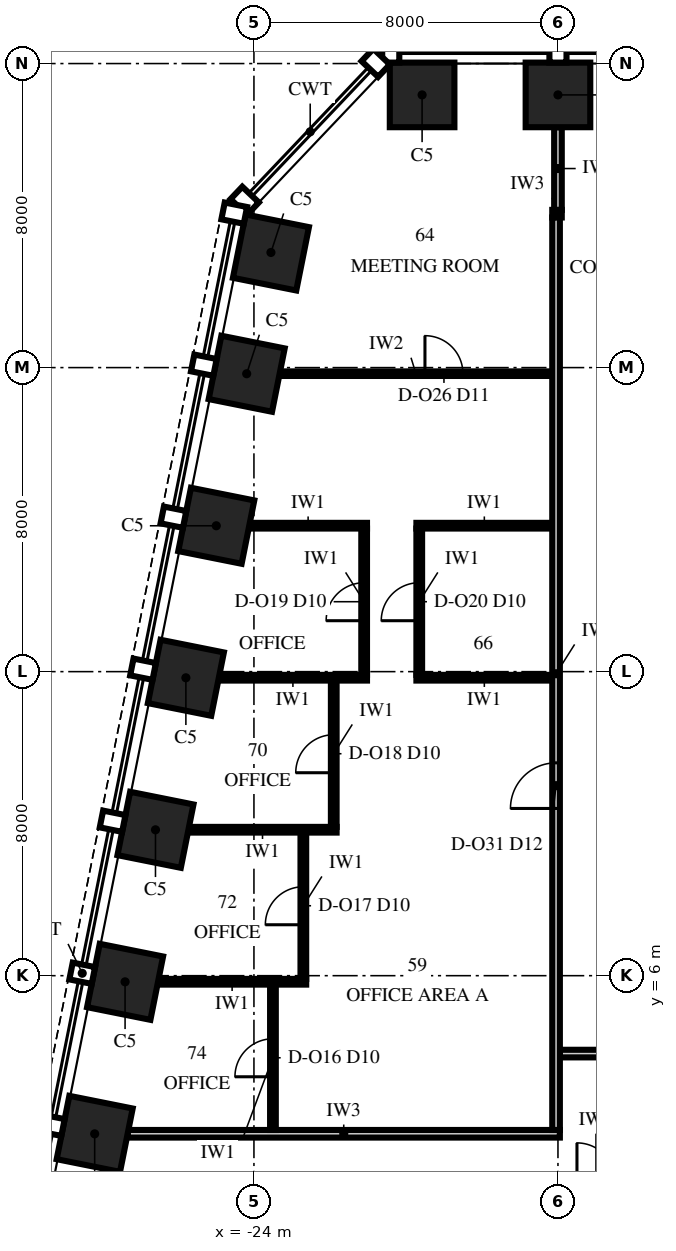
"""IFC4 building model, lengths in metres.
Left out: names, types, materials, properties, quantities, classifications, styles, units other than length and angle.
Written with IfcOpenShell. Run it as: python <this file> out.ifc"""

import sys

from ifc_helpers import new_model, si_unit, direction, frame, frame_2d, origin, origin_2d, place, context, subcontext, project, spatial, rectangle, extrude, element, fill, save


model = new_model("IFC4")
c1 = context("Model", 3, precision=1e-05, world=origin(), true_north=direction((0.0, 1.0)))
c2 = subcontext(c1, "Body", "Model", "MODEL_VIEW")
j1 = project(units=[si_unit("LENGTHUNIT", "METRE"), si_unit("PLANEANGLEUNIT", "RADIAN")], contexts=[c1])
p1 = place(None, origin())
s1 = spatial("IfcSite", under=j1, at=p1, CompositionType="ELEMENT")
p2 = place(p1, origin())
s2 = spatial("IfcBuilding", under=s1, at=p2, CompositionType="ELEMENT")
p3 = place(p2, frame((0.0, 0.0, 248.0)))
s3 = spatial("IfcBuildingStorey", under=s2, at=p3, CompositionType="ELEMENT", Elevation=248.0)
for number, where, z_axis, x_axis in (
    (1, (-16.0, 29.175, 0.0), (0.0, 0.0, 1.0), (-1.0, 0.0, 0.0)),
    (2, (-19.575, 29.175, 0.0), (0.0, 0.0, 1.0), (-1.0, 0.0, 0.0)),
    (3, (-23.553, 25.029, 0.0), (0.0, 0.0, 1.0), (-0.196, -0.981, 0.0)),
    (4, (-24.191, 21.838, 0.0), (0.0, 0.0, 1.0), (-0.196, -0.981, 0.0)),
    (5, (-24.991, 17.838, 0.0), (0.0, 0.0, 1.0), (-0.196, -0.981, 0.0)),
    (6, (-25.791, 13.838, 0.0), (0.0, 0.0, 1.0), (-0.196, -0.981, 0.0)),
    (7, (-26.591, 9.838, 0.0), (0.0, 0.0, 1.0), (-0.196, -0.981, 0.0)),
    (8, (-27.391, 5.838, 0.0), (0.0, 0.0, 1.0), (-0.196, -0.981, 0.0)),
    (9, (-28.191, 1.838, 0.0), (0.0, 0.0, 1.0), (-0.196, -0.981, 0.0)),
):
    element("IfcColumn", number, at=place(p3, frame(where, z_axis=z_axis, x_axis=x_axis)), inside=s3, PredefinedType="COLUMN", context=c2, shape_type="SweptSolid", body=[
        extrude(rectangle(XDim=1.7, YDim=1.7, at=origin_2d()), origin(), (0.0, 0.0, 1.0), 4.0),
    ])
p4 = place(p3, frame((-27.324, 1.84, 0.0), z_axis=(0.0, 0.0, 1.0), x_axis=(1.0, 0.0, 0.0)))
e10 = element("IfcWall", 10, at=p4, inside=s3, PredefinedType="PARTITIONING", context=c2, shape_type="SweptSolid", body=[
    extrude(rectangle(XDim=11.374, YDim=0.2, at=frame_2d((5.687, 0.0))), origin(), (0.0, 0.0, 1.0), 3.23),
])
p5 = place(p3, frame((-15.95, 3.95, 0.0), z_axis=(0.0, 0.0, 1.0), x_axis=(1.0, 0.0, 0.0)))
e11 = element("IfcWall", 11, at=p5, inside=s3, PredefinedType="PARTITIONING", context=c2, shape_type="SweptSolid", body=[
    extrude(rectangle(XDim=31.9, YDim=0.2, at=frame_2d((15.95, 0.0))), origin(), (0.0, 0.0, 1.0), 3.23),
])
p6 = place(p5, frame((3.35, 0.0, 0.0)))
e12 = element("IfcOpeningElement", 12, at=p6, cuts=e11, PredefinedType="OPENING", context=c2, shape_type="SweptSolid", body=[
    extrude(rectangle(XDim=1.2, YDim=2.4, at=frame_2d((0.6, 1.2))), frame((0.0, 0.115, 0.0), z_axis=(0.0, -1.0, 0.0), x_axis=(1.0, 0.0, 0.0)), (0.0, 0.0, 1.0), 0.23),
])
p7 = place(p5, frame((27.35, 0.0, 0.0)))
e13 = element("IfcOpeningElement", 13, at=p7, cuts=e11, PredefinedType="OPENING", context=c2, shape_type="SweptSolid", body=[
    extrude(rectangle(XDim=1.2, YDim=2.4, at=frame_2d((0.6, 1.2))), frame((0.0, 0.115, 0.0), z_axis=(0.0, -1.0, 0.0), x_axis=(1.0, 0.0, 0.0)), (0.0, 0.0, 1.0), 0.23),
])
p8 = place(p5, frame((15.35, 0.0, 0.0)))
e14 = element("IfcOpeningElement", 14, at=p8, cuts=e11, PredefinedType="OPENING", context=c2, shape_type="SweptSolid", body=[
    extrude(rectangle(XDim=1.2, YDim=2.4, at=frame_2d((0.6, 1.2))), frame((0.0, 0.115, 0.0), z_axis=(0.0, -1.0, 0.0), x_axis=(1.0, 0.0, 0.0)), (0.0, 0.0, 1.0), 0.23),
])
p9 = place(p3, frame((-26.524, 5.84, 0.0), z_axis=(0.0, 0.0, 1.0), x_axis=(1.0, 0.0, 0.0)))
e15 = element("IfcWall", 15, at=p9, inside=s3, PredefinedType="PARTITIONING", context=c2, shape_type="SweptSolid", body=[
    extrude(rectangle(XDim=3.899, YDim=0.15, at=frame_2d((1.949, 0.0))), origin(), (0.0, 0.0, 1.0), 2.842),
])
for number, where, z_axis, x_axis in (
    (16, (-25.724, 9.84, 0.0), (0.0, 0.0, 1.0), (1.0, 0.0, 0.0)),
    (17, (-24.924, 13.84, 0.0), (0.0, 0.0, 1.0), (1.0, 0.0, 0.0)),
):
    element("IfcWall", number, at=place(p3, frame(where, z_axis=z_axis, x_axis=x_axis)), inside=s3, PredefinedType="PARTITIONING", context=c2, shape_type="SweptSolid", body=[
        extrude(rectangle(XDim=3.899, YDim=0.15, at=frame_2d((1.949, 0.0))), origin(), (0.0, 0.0, 1.0), 3.23),
    ])
p10 = place(p3, frame((-19.725, 13.84, 0.0), z_axis=(0.0, 0.0, 1.0), x_axis=(1.0, 0.0, 0.0)))
e18 = element("IfcWall", 18, at=p10, inside=s3, PredefinedType="PARTITIONING", context=c2, shape_type="SweptSolid", body=[
    extrude(rectangle(XDim=3.575, YDim=0.15, at=frame_2d((1.788, 0.0))), origin(), (0.0, 0.0, 1.0), 3.85),
])
p11 = place(p3, frame((-24.124, 17.84, 0.0), z_axis=(0.0, 0.0, 1.0), x_axis=(1.0, 0.0, 0.0)))
e19 = element("IfcWall", 19, at=p11, inside=s3, PredefinedType="PARTITIONING", context=c2, shape_type="SweptSolid", body=[
    extrude(rectangle(XDim=3.099, YDim=0.15, at=frame_2d((1.549, 0.0))), origin(), (0.0, 0.0, 1.0), 3.23),
])
p12 = place(p3, frame((-19.725, 17.84, 0.0), z_axis=(0.0, 0.0, 1.0), x_axis=(1.0, 0.0, 0.0)))
e20 = element("IfcWall", 20, at=p12, inside=s3, PredefinedType="PARTITIONING", context=c2, shape_type="SweptSolid", body=[
    extrude(rectangle(XDim=3.575, YDim=0.15, at=frame_2d((1.788, 0.0))), origin(), (0.0, 0.0, 1.0), 3.23),
])
p13 = place(p3, frame((-23.324, 21.84, 0.0), z_axis=(0.0, 0.0, 1.0), x_axis=(1.0, 0.0, 0.0)))
e21 = element("IfcWall", 21, at=p13, inside=s3, PredefinedType="PARTITIONING", context=c2, shape_type="SweptSolid", body=[
    extrude(rectangle(XDim=7.174, YDim=0.12, at=frame_2d((3.587, 0.0))), origin(), (0.0, 0.0, 1.0), 3.23),
])
p14 = place(p13, frame((3.824, 0.0, 0.0)))
e22 = element("IfcOpeningElement", 22, at=p14, cuts=e21, PredefinedType="OPENING", context=c2, shape_type="SweptSolid", body=[
    extrude(rectangle(XDim=1.0, YDim=2.4, at=frame_2d((0.5, 1.2))), frame((0.0, 0.075, 0.0), z_axis=(0.0, -1.0, 0.0), x_axis=(1.0, 0.0, 0.0)), (0.0, 0.0, 1.0), 0.15),
])
p15 = place(p3, frame((-16.15, 26.05, 0.0), z_axis=(0.0, 0.0, 1.0), x_axis=(1.0, 0.0, 0.0)))
e23 = element("IfcWall", 23, at=p15, inside=s3, PredefinedType="PARTITIONING", context=c2, shape_type="SweptSolid", body=[
    extrude(rectangle(XDim=0.25, YDim=0.2, at=frame_2d((0.125, 0.0))), origin(), (0.0, 0.0, 1.0), 3.418),
])
p16 = place(p3, frame((-23.5, 1.94, 0.0), z_axis=(0.0, 0.0, 1.0), x_axis=(0.0, 1.0, 0.0)))
e24 = element("IfcWall", 24, at=p16, inside=s3, PredefinedType="PARTITIONING", context=c2, shape_type="SweptSolid", body=[
    extrude(rectangle(XDim=3.825, YDim=0.15, at=frame_2d((1.913, 0.0))), origin(), (0.0, 0.0, 1.0), 3.85),
])
p17 = place(p16, frame((1.4, 0.0, 0.0)))
e25 = element("IfcOpeningElement", 25, at=p17, cuts=e24, PredefinedType="OPENING", context=c2, shape_type="SweptSolid", body=[
    extrude(rectangle(XDim=1.0, YDim=2.3, at=frame_2d((0.5, 1.15))), frame((0.0, 0.09, 0.0), z_axis=(0.0, -1.0, 0.0), x_axis=(1.0, 0.0, 0.0)), (0.0, 0.0, 1.0), 0.18),
])
p18 = place(p3, frame((-22.7, 5.915, 0.0), z_axis=(0.0, 0.0, 1.0), x_axis=(0.0, 1.0, 0.0)))
e26 = element("IfcWall", 26, at=p18, inside=s3, PredefinedType="PARTITIONING", context=c2, shape_type="SweptSolid", body=[
    extrude(rectangle(XDim=3.85, YDim=0.15, at=frame_2d((1.925, 0.0))), origin(), (0.0, 0.0, 1.0), 2.842),
])
p19 = place(p18, frame((1.425, 0.0, 0.0)))
e27 = element("IfcOpeningElement", 27, at=p19, cuts=e26, PredefinedType="OPENING", context=c2, shape_type="SweptSolid", body=[
    extrude(rectangle(XDim=1.0, YDim=2.3, at=frame_2d((0.5, 1.15))), frame((0.0, 0.09, 0.0), z_axis=(0.0, -1.0, 0.0), x_axis=(1.0, 0.0, 0.0)), (0.0, 0.0, 1.0), 0.18),
])
p20 = place(p3, frame((-21.9, 9.915, 0.0), z_axis=(0.0, 0.0, 1.0), x_axis=(0.0, 1.0, 0.0)))
e28 = element("IfcWall", 28, at=p20, inside=s3, PredefinedType="PARTITIONING", context=c2, shape_type="SweptSolid", body=[
    extrude(rectangle(XDim=3.85, YDim=0.15, at=frame_2d((1.925, 0.0))), origin(), (0.0, 0.0, 1.0), 3.85),
])
p21 = place(p20, frame((1.425, 0.0, 0.0)))
e29 = element("IfcOpeningElement", 29, at=p21, cuts=e28, PredefinedType="OPENING", context=c2, shape_type="SweptSolid", body=[
    extrude(rectangle(XDim=1.0, YDim=2.3, at=frame_2d((0.5, 1.15))), frame((0.0, 0.09, 0.0), z_axis=(0.0, -1.0, 0.0), x_axis=(1.0, 0.0, 0.0)), (0.0, 0.0, 1.0), 0.18),
])
p22 = place(p3, frame((-21.1, 13.915, 0.0), z_axis=(0.0, 0.0, 1.0), x_axis=(0.0, 1.0, 0.0)))
e30 = element("IfcWall", 30, at=p22, inside=s3, PredefinedType="PARTITIONING", context=c2, shape_type="SweptSolid", body=[
    extrude(rectangle(XDim=3.85, YDim=0.15, at=frame_2d((1.925, 0.0))), origin(), (0.0, 0.0, 1.0), 3.23),
])
p23 = place(p22, frame((1.425, 0.0, 0.0)))
e31 = element("IfcOpeningElement", 31, at=p23, cuts=e30, PredefinedType="OPENING", context=c2, shape_type="SweptSolid", body=[
    extrude(rectangle(XDim=1.0, YDim=2.3, at=frame_2d((0.5, 1.15))), frame((0.0, 0.09, 0.0), z_axis=(0.0, -1.0, 0.0), x_axis=(1.0, 0.0, 0.0)), (0.0, 0.0, 1.0), 0.18),
])
p24 = place(p3, frame((-19.65, 13.915, 0.0), z_axis=(0.0, 0.0, 1.0), x_axis=(0.0, 1.0, 0.0)))
e32 = element("IfcWall", 32, at=p24, inside=s3, PredefinedType="PARTITIONING", context=c2, shape_type="SweptSolid", body=[
    extrude(rectangle(XDim=3.85, YDim=0.15, at=frame_2d((1.925, 0.0))), origin(), (0.0, 0.0, 1.0), 3.23),
])
p25 = place(p24, frame((1.425, 0.0, 0.0)))
e33 = element("IfcOpeningElement", 33, at=p25, cuts=e32, PredefinedType="OPENING", context=c2, shape_type="SweptSolid", body=[
    extrude(rectangle(XDim=1.0, YDim=2.3, at=frame_2d((0.5, 1.15))), frame((0.0, 0.09, 0.0), z_axis=(0.0, -1.0, 0.0), x_axis=(1.0, 0.0, 0.0)), (0.0, 0.0, 1.0), 0.18),
])
p26 = place(p3, frame((-16.05, 1.94, 0.0), z_axis=(0.0, 0.0, 1.0), x_axis=(0.0, 1.0, 0.0)))
e34 = element("IfcWall", 34, at=p26, inside=s3, PredefinedType="PARTITIONING", context=c2, shape_type="SweptSolid", body=[
    extrude(rectangle(XDim=24.01, YDim=0.2, at=frame_2d((12.005, 0.0))), origin(), (0.0, 0.0, 1.0), 2.842),
])
p27 = place(p26, frame((8.46, 0.0, 0.0)))
e35 = element("IfcOpeningElement", 35, at=p27, cuts=e34, PredefinedType="OPENING", context=c2, shape_type="SweptSolid", body=[
    extrude(rectangle(XDim=1.2, YDim=2.4, at=frame_2d((0.6, 1.2))), frame((0.0, 0.115, 0.0), z_axis=(0.0, -1.0, 0.0), x_axis=(1.0, 0.0, 0.0)), (0.0, 0.0, 1.0), 0.23),
])
p28 = place(p3, frame((-16.0, 26.15, 0.0), z_axis=(0.0, 0.0, 1.0), x_axis=(0.0, 1.0, 0.0)))
e36 = element("IfcWall", 36, at=p28, inside=s3, PredefinedType="PARTITIONING", context=c2, shape_type="SweptSolid", body=[
    extrude(rectangle(XDim=2.175, YDim=0.2, at=frame_2d((1.087, 0.0))), origin(), (0.0, 0.0, 1.0), 3.418),
])
p29 = place(p17, origin())
e37 = element("IfcDoor", 37, at=p29, inside=s3, OperationType="SINGLE_SWING_LEFT", PredefinedType="DOOR", context=c2, shape_type="SweptSolid", body=[
    extrude(rectangle(XDim=1.0, YDim=2.3, at=frame_2d((0.5, 1.15))), frame((0.0, 0.075, 0.0), z_axis=(0.0, -1.0, 0.0), x_axis=(1.0, 0.0, 0.0)), (0.0, 0.0, 1.0), 0.149),
])
fill(e25, e37)
p30 = place(p19, origin())
e38 = element("IfcDoor", 38, at=p30, inside=s3, OperationType="SINGLE_SWING_LEFT", PredefinedType="DOOR", context=c2, shape_type="SweptSolid", body=[
    extrude(rectangle(XDim=1.0, YDim=2.3, at=frame_2d((0.5, 1.15))), frame((0.0, 0.075, 0.0), z_axis=(0.0, -1.0, 0.0), x_axis=(1.0, 0.0, 0.0)), (0.0, 0.0, 1.0), 0.149),
])
fill(e27, e38)
p31 = place(p21, origin())
e39 = element("IfcDoor", 39, at=p31, inside=s3, OperationType="SINGLE_SWING_LEFT", PredefinedType="DOOR", context=c2, shape_type="SweptSolid", body=[
    extrude(rectangle(XDim=1.0, YDim=2.3, at=frame_2d((0.5, 1.15))), frame((0.0, 0.075, 0.0), z_axis=(0.0, -1.0, 0.0), x_axis=(1.0, 0.0, 0.0)), (0.0, 0.0, 1.0), 0.149),
])
fill(e29, e39)
p32 = place(p23, origin())
e40 = element("IfcDoor", 40, at=p32, inside=s3, OperationType="SINGLE_SWING_LEFT", PredefinedType="DOOR", context=c2, shape_type="SweptSolid", body=[
    extrude(rectangle(XDim=1.0, YDim=2.3, at=frame_2d((0.5, 1.15))), frame((0.0, 0.075, 0.0), z_axis=(0.0, -1.0, 0.0), x_axis=(1.0, 0.0, 0.0)), (0.0, 0.0, 1.0), 0.149),
])
fill(e31, e40)
p33 = place(p25, origin())
e41 = element("IfcDoor", 41, at=p33, inside=s3, OperationType="SINGLE_SWING_LEFT", PredefinedType="DOOR", context=c2, shape_type="SweptSolid", body=[
    extrude(rectangle(XDim=1.0, YDim=2.3, at=frame_2d((0.5, 1.15))), frame((0.0, 0.075, 0.0), z_axis=(0.0, -1.0, 0.0), x_axis=(1.0, 0.0, 0.0)), (0.0, 0.0, 1.0), 0.149),
])
fill(e33, e41)
p34 = place(p14, origin())
e42 = element("IfcDoor", 42, at=p34, inside=s3, OperationType="SINGLE_SWING_RIGHT", PredefinedType="DOOR", context=c2, shape_type="SweptSolid", body=[
    extrude(rectangle(XDim=1.0, YDim=2.4, at=frame_2d((0.5, 1.2))), frame((0.0, 0.06, 0.0), z_axis=(0.0, -1.0, 0.0), x_axis=(1.0, 0.0, 0.0)), (0.0, 0.0, 1.0), 0.12),
])
fill(e22, e42)
p35 = place(p27, origin())
e43 = element("IfcDoor", 43, at=p35, inside=s3, OperationType="SINGLE_SWING_LEFT", PredefinedType="DOOR", context=c2, shape_type="SweptSolid", body=[
    extrude(rectangle(XDim=1.2, YDim=2.4, at=frame_2d((0.6, 1.2))), frame((0.0, 0.1, 0.0), z_axis=(0.0, -1.0, 0.0), x_axis=(1.0, 0.0, 0.0)), (0.0, 0.0, 1.0), 0.199),
])
fill(e35, e43)
save(model, sys.argv[1])
